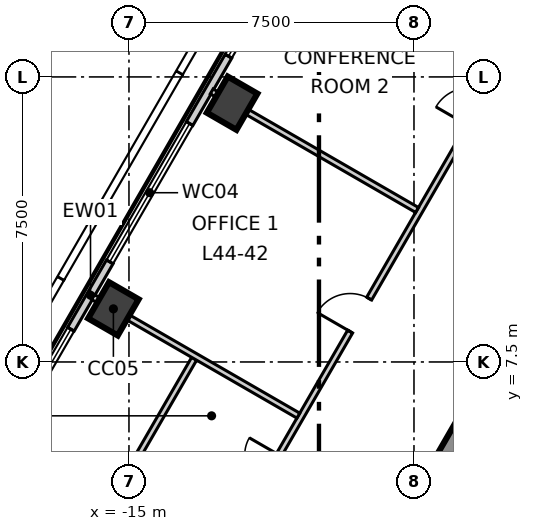
"""IFC4 building model, lengths in metres.
Left out: names, types, materials, properties, quantities, classifications, styles, units other than length and angle.
Written with IfcOpenShell. Run it as: python <this file> out.ifc"""

import sys

from ifc_helpers import new_model, si_unit, direction, frame, frame_2d, origin, origin_2d, place, context, subcontext, project, spatial, polyline, rectangle, outline, extrude, element, fill, save


model = new_model("IFC4")
c1 = context("Model", 3, precision=1e-05, world=origin(), true_north=direction((0.0, 1.0)))
c2 = subcontext(c1, "Body", "Model", "MODEL_VIEW")
j1 = project(units=[si_unit("LENGTHUNIT", "METRE"), si_unit("PLANEANGLEUNIT", "RADIAN")], contexts=[c1])
p1 = place(None, origin())
s1 = spatial("IfcSite", under=j1, at=p1, CompositionType="ELEMENT")
p2 = place(p1, origin())
s2 = spatial("IfcBuilding", under=s1, at=p2, CompositionType="ELEMENT")
p3 = place(p2, frame((0.0, 0.0, 191.3)))
s3 = spatial("IfcBuildingStorey", under=s2, at=p3, CompositionType="ELEMENT", Elevation=191.3)
p4 = place(p3, frame((-1.703, 13.35, -0.3), z_axis=(0.0, 0.0, 1.0), x_axis=(-0.500011533395, -0.866018744874, 0.0)))
e1 = element("IfcWall", 1, at=p4, inside=s3, PredefinedType="SHEAR", context=c2, shape_type="SweptSolid", body=[
    extrude(outline(polyline([(-0.202, -0.35), (1.782, -0.35), (3.766, -0.35), (5.75, -0.35), (7.734, -0.35), (9.718, -0.35), (11.702, -0.35), (13.686, -0.35), (15.67, -0.35), (17.654, -0.35), (19.638, -0.35), (21.622, -0.35), (21.218, 0.35), (19.307, 0.35), (17.397, 0.35), (15.486, 0.35), (13.576, 0.35), (11.665, 0.35), (9.755, 0.35), (7.844, 0.35), (5.934, 0.35), (4.023, 0.35), (2.113, 0.35), (0.202, 0.35), (-0.202, -0.35)])), origin(), (0.0, 0.0, 1.0), 4.0),
])
p5 = place(p4, frame((10.16, 0.0, 0.3)))
e2 = element("IfcOpeningElement", 2, at=p5, cuts=e1, PredefinedType="OPENING", context=c2, shape_type="SweptSolid", body=[
    extrude(rectangle(XDim=1.1, YDim=2.1, at=frame_2d((0.55, 1.05))), frame((0.0, 0.36, 0.0), z_axis=(0.0, -1.0, 0.0), x_axis=(1.0, 0.0, 0.0)), (0.0, 0.0, 1.0), 0.72),
])
for number, where, z_axis, x_axis in (
    (3, (-12.286, 14.309, -0.3), (0.0, 0.0, 1.0), (0.5, 0.866, 0.0)),
    (4, (-15.41, 8.898, -0.3), (0.0, 0.0, 1.0), (0.5, 0.866, 0.0)),
):
    element("IfcColumn", number, at=place(p3, frame(where, z_axis=z_axis, x_axis=x_axis)), inside=s3, PredefinedType="COLUMN", context=c2, shape_type="SweptSolid", body=[
        extrude(rectangle(XDim=1.1, YDim=0.9, at=origin_2d()), origin(), (0.0, 0.0, 1.0), 4.0),
    ])
p6 = place(p3, frame((-2.869, 32.02, 0.0), z_axis=(0.0, 0.0, 1.0), x_axis=(-0.500006930241, -0.866021402571, 0.0)))
e5 = element("IfcWall", 5, at=p6, inside=s3, PredefinedType="ELEMENTEDWALL", context=c2, shape_type="SweptSolid", body=[
    extrude(rectangle(XDim=52.572, YDim=0.2, at=frame_2d((26.286, 0.0))), origin(), (0.0, 0.0, 1.0), 3.7),
])
p7 = place(p6, frame((2.327, 0.0, 0.9)))
e6 = element("IfcOpeningElement", 6, at=p7, cuts=e5, PredefinedType="OPENING", context=c2, shape_type="SweptSolid", body=[
    extrude(rectangle(XDim=4.2, YDim=2.5, at=frame_2d((2.1, 1.25))), frame((0.0, 0.11, 0.0), z_axis=(0.0, -1.0, 0.0), x_axis=(1.0, 0.0, 0.0)), (0.0, 0.0, 1.0), 0.22),
])
p8 = place(p6, frame((8.575, 0.0, 0.9)))
e7 = element("IfcOpeningElement", 7, at=p8, cuts=e5, PredefinedType="OPENING", context=c2, shape_type="SweptSolid", body=[
    extrude(rectangle(XDim=4.2, YDim=2.5, at=frame_2d((2.1, 1.25))), frame((0.0, 0.11, 0.0), z_axis=(0.0, -1.0, 0.0), x_axis=(1.0, 0.0, 0.0)), (0.0, 0.0, 1.0), 0.22),
])
p9 = place(p6, frame((14.823, 0.0, 0.9)))
e8 = element("IfcOpeningElement", 8, at=p9, cuts=e5, PredefinedType="OPENING", context=c2, shape_type="SweptSolid", body=[
    extrude(rectangle(XDim=4.2, YDim=2.5, at=frame_2d((2.1, 1.25))), frame((0.0, 0.11, 0.0), z_axis=(0.0, -1.0, 0.0), x_axis=(1.0, 0.0, 0.0)), (0.0, 0.0, 1.0), 0.22),
])
p10 = place(p6, frame((21.071, 0.0, 0.9)))
e9 = element("IfcOpeningElement", 9, at=p10, cuts=e5, PredefinedType="OPENING", context=c2, shape_type="SweptSolid", body=[
    extrude(rectangle(XDim=4.2, YDim=2.5, at=frame_2d((2.1, 1.25))), frame((0.0, 0.11, 0.0), z_axis=(0.0, -1.0, 0.0), x_axis=(1.0, 0.0, 0.0)), (0.0, 0.0, 1.0), 0.22),
])
p11 = place(p6, frame((27.319, 0.0, 0.9)))
e10 = element("IfcOpeningElement", 10, at=p11, cuts=e5, PredefinedType="OPENING", context=c2, shape_type="SweptSolid", body=[
    extrude(rectangle(XDim=4.2, YDim=2.5, at=frame_2d((2.1, 1.25))), frame((0.0, 0.11, 0.0), z_axis=(0.0, -1.0, 0.0), x_axis=(1.0, 0.0, 0.0)), (0.0, 0.0, 1.0), 0.22),
])
p12 = place(p6, frame((33.568, 0.0, 0.9)))
e11 = element("IfcOpeningElement", 11, at=p12, cuts=e5, PredefinedType="OPENING", context=c2, shape_type="SweptSolid", body=[
    extrude(rectangle(XDim=4.2, YDim=2.5, at=frame_2d((2.1, 1.25))), frame((0.0, 0.11, 0.0), z_axis=(0.0, -1.0, 0.0), x_axis=(1.0, 0.0, 0.0)), (0.0, 0.0, 1.0), 0.22),
])
p13 = place(p6, frame((39.816, 0.0, 0.9)))
e12 = element("IfcOpeningElement", 12, at=p13, cuts=e5, PredefinedType="OPENING", context=c2, shape_type="SweptSolid", body=[
    extrude(rectangle(XDim=4.2, YDim=2.5, at=frame_2d((2.1, 1.25))), frame((0.0, 0.11, 0.0), z_axis=(0.0, -1.0, 0.0), x_axis=(1.0, 0.0, 0.0)), (0.0, 0.0, 1.0), 0.22),
])
p14 = place(p6, frame((46.064, 0.0, 0.9)))
e13 = element("IfcOpeningElement", 13, at=p14, cuts=e5, PredefinedType="OPENING", context=c2, shape_type="SweptSolid", body=[
    extrude(rectangle(XDim=4.2, YDim=2.5, at=frame_2d((2.1, 1.25))), frame((0.0, 0.11, 0.0), z_axis=(0.0, -1.0, 0.0), x_axis=(1.0, 0.0, 0.0)), (0.0, 0.0, 1.0), 0.22),
])
p15 = place(p3, frame((-20.882, -11.969, 0.0), z_axis=(0.0, 0.0, 1.0), x_axis=(0.499998738735, 0.866026131975, 0.0)))
e14 = element("IfcWall", 14, at=p15, inside=s3, PredefinedType="PARTITIONING", context=c2, shape_type="SweptSolid", body=[
    extrude(rectangle(XDim=41.764, YDim=0.15, at=frame_2d((20.882, 0.0))), origin(), (0.0, 0.0, 1.0), 3.7),
])
p16 = place(p15, frame((37.014, 0.0, 0.0)))
e15 = element("IfcOpeningElement", 15, at=p16, cuts=e14, PredefinedType="OPENING", context=c2, shape_type="SweptSolid", body=[
    extrude(rectangle(XDim=1.0, YDim=2.1, at=frame_2d((0.5, 1.05))), frame((0.0, 0.085, 0.0), z_axis=(0.0, -1.0, 0.0), x_axis=(1.0, 0.0, 0.0)), (0.0, 0.0, 1.0), 0.17),
])
p17 = place(p15, frame((29.653, 0.0, 0.0)))
e16 = element("IfcOpeningElement", 16, at=p17, cuts=e14, PredefinedType="OPENING", context=c2, shape_type="SweptSolid", body=[
    extrude(rectangle(XDim=1.0, YDim=2.1, at=frame_2d((0.5, 1.05))), frame((0.0, 0.085, 0.0), z_axis=(0.0, -1.0, 0.0), x_axis=(1.0, 0.0, 0.0)), (0.0, 0.0, 1.0), 0.17),
])
p18 = place(p15, frame((23.405, 0.0, 0.0)))
e17 = element("IfcOpeningElement", 17, at=p18, cuts=e14, PredefinedType="OPENING", context=c2, shape_type="SweptSolid", body=[
    extrude(rectangle(XDim=1.0, YDim=2.1, at=frame_2d((0.5, 1.05))), frame((0.0, 0.085, 0.0), z_axis=(0.0, -1.0, 0.0), x_axis=(1.0, 0.0, 0.0)), (0.0, 0.0, 1.0), 0.17),
])
p19 = place(p15, frame((9.657, 0.0, 0.0)))
e18 = element("IfcOpeningElement", 18, at=p19, cuts=e14, PredefinedType="OPENING", context=c2, shape_type="SweptSolid", body=[
    extrude(rectangle(XDim=1.1, YDim=2.1, at=frame_2d((0.55, 1.05))), frame((0.0, 0.085, 0.0), z_axis=(0.0, -1.0, 0.0), x_axis=(1.0, 0.0, 0.0)), (0.0, 0.0, 1.0), 0.17),
])
p20 = place(p15, frame((18.757, 0.0, 0.0)))
e19 = element("IfcOpeningElement", 19, at=p20, cuts=e14, PredefinedType="OPENING", context=c2, shape_type="SweptSolid", body=[
    extrude(rectangle(XDim=0.9, YDim=2.1, at=frame_2d((0.45, 1.05))), frame((0.0, 0.085, 0.0), z_axis=(0.0, -1.0, 0.0), x_axis=(1.0, 0.0, 0.0)), (0.0, 0.0, 1.0), 0.17),
])
p21 = place(p15, frame((15.557, 0.0, 0.0)))
e20 = element("IfcOpeningElement", 20, at=p21, cuts=e14, PredefinedType="OPENING", context=c2, shape_type="SweptSolid", body=[
    extrude(rectangle(XDim=0.9, YDim=2.1, at=frame_2d((0.45, 1.05))), frame((0.0, 0.085, 0.0), z_axis=(0.0, -1.0, 0.0), x_axis=(1.0, 0.0, 0.0)), (0.0, 0.0, 1.0), 0.17),
])
p22 = place(p15, frame((12.657, 0.0, 0.0)))
e21 = element("IfcOpeningElement", 21, at=p22, cuts=e14, PredefinedType="OPENING", context=c2, shape_type="SweptSolid", body=[
    extrude(rectangle(XDim=1.0, YDim=2.1, at=frame_2d((0.5, 1.05))), frame((0.0, 0.085, 0.0), z_axis=(0.0, -1.0, 0.0), x_axis=(1.0, 0.0, 0.0)), (0.0, 0.0, 1.0), 0.17),
])
p23 = place(p15, frame((3.56, 0.0, 0.0)))
e22 = element("IfcOpeningElement", 22, at=p23, cuts=e14, PredefinedType="OPENING", context=c2, shape_type="SweptSolid", body=[
    extrude(rectangle(XDim=1.1, YDim=2.1, at=frame_2d((0.55, 1.05))), frame((0.0, 0.085, 0.0), z_axis=(0.0, -1.0, 0.0), x_axis=(1.0, 0.0, 0.0)), (0.0, 0.0, 1.0), 0.17),
])
p24 = place(p3, frame((-17.648, 0.029, 0.0), z_axis=(0.0, 0.0, 1.0), x_axis=(0.500054279689, 0.865994063124, 0.0)))
e23 = element("IfcWall", 23, at=p24, inside=s3, PredefinedType="PARTITIONING", context=c2, shape_type="SweptSolid", body=[
    extrude(rectangle(XDim=8.725, YDim=0.15, at=frame_2d((4.363, 0.0))), origin(), (0.0, 0.0, 1.0), 3.7),
])
p25 = place(p3, frame((-15.947, 9.208, 0.0), z_axis=(0.0, 0.0, 1.0), x_axis=(0.86601944389, -0.500010322698, 0.0)))
e24 = element("IfcWall", 24, at=p25, inside=s3, PredefinedType="PARTITIONING", context=c2, shape_type="SweptSolid", body=[
    extrude(rectangle(XDim=6.24, YDim=0.15, at=frame_2d((3.12, 0.0))), origin(), (0.0, 0.0, 1.0), 3.2),
])
p26 = place(p3, frame((-12.823, 14.619, 0.0), z_axis=(0.0, 0.0, 1.0), x_axis=(0.866036385336, -0.499980978912, 0.0)))
e25 = element("IfcWall", 25, at=p26, inside=s3, PredefinedType="PARTITIONING", context=c2, shape_type="SweptSolid", body=[
    extrude(rectangle(XDim=6.24, YDim=0.15, at=frame_2d((3.12, 0.0))), origin(), (0.0, 0.0, 1.0), 3.7),
])
p27 = place(p9, origin())
e26 = element("IfcWindow", 26, at=p27, inside=s3, PartitioningType="SINGLE_PANEL", PredefinedType="WINDOW", context=c2, shape_type="SweptSolid", body=[
    extrude(rectangle(XDim=4.2, YDim=2.5, at=frame_2d((2.1, 1.25))), frame((0.0, 0.03, 0.0), z_axis=(0.0, -1.0, 0.0), x_axis=(1.0, 0.0, 0.0)), (0.0, 0.0, 1.0), 0.06),
])
fill(e8, e26)
p28 = place(p10, origin())
e27 = element("IfcWindow", 27, at=p28, inside=s3, PartitioningType="SINGLE_PANEL", PredefinedType="WINDOW", context=c2, shape_type="SweptSolid", body=[
    extrude(rectangle(XDim=4.2, YDim=2.5, at=frame_2d((2.1, 1.25))), frame((0.0, 0.03, 0.0), z_axis=(0.0, -1.0, 0.0), x_axis=(1.0, 0.0, 0.0)), (0.0, 0.0, 1.0), 0.06),
])
fill(e9, e27)
p29 = place(p11, origin())
e28 = element("IfcWindow", 28, at=p29, inside=s3, PartitioningType="SINGLE_PANEL", PredefinedType="WINDOW", context=c2, shape_type="SweptSolid", body=[
    extrude(rectangle(XDim=4.2, YDim=2.5, at=frame_2d((2.1, 1.25))), frame((0.0, 0.03, 0.0), z_axis=(0.0, -1.0, 0.0), x_axis=(1.0, 0.0, 0.0)), (0.0, 0.0, 1.0), 0.06),
])
fill(e10, e28)
p30 = place(p18, origin())
e29 = element("IfcDoor", 29, at=p30, inside=s3, OperationType="SINGLE_SWING_RIGHT", PredefinedType="DOOR", context=c2, shape_type="SweptSolid", body=[
    extrude(rectangle(XDim=1.0, YDim=2.1, at=frame_2d((0.5, 1.05))), frame((0.0, 0.025, 0.0), z_axis=(0.0, -1.0, 0.0), x_axis=(1.0, 0.0, 0.0)), (0.0, 0.0, 1.0), 0.05),
])
fill(e17, e29)
save(model, sys.argv[1])
